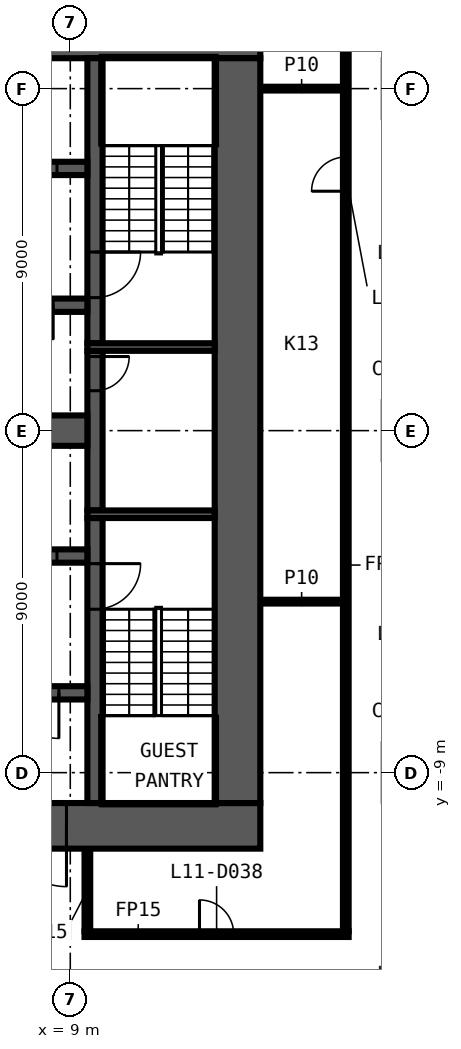
"""IFC4 building model, lengths in metres.
Left out: names, types, materials, properties, quantities, classifications, styles, units other than length and angle.
Written with IfcOpenShell. Run it as: python <this file> out.ifc"""

import sys

from ifc_helpers import new_model, si_unit, direction, frame, frame_2d, origin, place, context, subcontext, project, spatial, rectangle, extrude, element, fill, save


model = new_model("IFC4")
c1 = context("Model", 3, precision=1e-05, world=origin(), true_north=direction((0.0, 1.0)))
c2 = subcontext(c1, "Body", "Model", "MODEL_VIEW")
j1 = project(units=[si_unit("LENGTHUNIT", "METRE"), si_unit("PLANEANGLEUNIT", "RADIAN")], contexts=[c1])
p1 = place(None, origin())
s1 = spatial("IfcSite", under=j1, at=p1, CompositionType="ELEMENT")
p2 = place(p1, origin())
s2 = spatial("IfcBuilding", under=s1, at=p2, CompositionType="ELEMENT")
p3 = place(p2, frame((0.0, 0.0, 62.5)))
s3 = spatial("IfcBuildingStorey", under=s2, at=p3, CompositionType="ELEMENT", Elevation=62.5)
p4 = place(p3, frame((9.375, -13.25, 0.0), z_axis=(0.0, 0.0, 1.0), x_axis=(1.0, 0.0, 0.0)))
e1 = element("IfcWall", 1, at=p4, inside=s3, PredefinedType="PARTITIONING", context=c2, shape_type="SweptSolid", body=[
    extrude(rectangle(XDim=6.95, YDim=0.15, at=frame_2d((3.475, 0.0))), origin(), (0.0, 0.0, 1.0), 3.3),
])
p5 = place(p4, frame((3.025, 0.0, 0.0)))
e2 = element("IfcOpeningElement", 2, at=p5, cuts=e1, PredefinedType="OPENING", context=c2, shape_type="SweptSolid", body=[
    extrude(rectangle(XDim=0.9, YDim=2.1, at=frame_2d((0.45, 1.05))), frame((0.0, 0.085, 0.0), z_axis=(0.0, -1.0, 0.0), x_axis=(1.0, 0.0, 0.0)), (0.0, 0.0, 1.0), 0.17),
])
for number, where, z_axis, x_axis in (
    (3, (14.0, -4.5, 0.0), (0.0, 0.0, 1.0), (1.0, 0.0, 0.0)),
    (4, (14.0, 9.0, 0.0), (0.0, 0.0, 1.0), (1.0, 0.0, 0.0)),
):
    element("IfcWall", number, at=place(p3, frame(where, z_axis=z_axis, x_axis=x_axis)), inside=s3, PredefinedType="PARTITIONING", context=c2, shape_type="SweptSolid", body=[
        extrude(rectangle(XDim=2.175, YDim=0.1, at=frame_2d((1.087, 0.0))), origin(), (0.0, 0.0, 1.0), 3.3),
    ])
p6 = place(p3, frame((16.25, -13.175, 0.0), z_axis=(0.0, 0.0, 1.0), x_axis=(0.0, 1.0, 0.0)))
e5 = element("IfcWall", 5, at=p6, inside=s3, PredefinedType="PARTITIONING", context=c2, shape_type="SweptSolid", body=[
    extrude(rectangle(XDim=26.35, YDim=0.15, at=frame_2d((13.175, 0.0))), origin(), (0.0, 0.0, 1.0), 3.3),
])
p7 = place(p6, frame((19.475, 0.0, 0.0)))
e6 = element("IfcOpeningElement", 6, at=p7, cuts=e5, PredefinedType="OPENING", context=c2, shape_type="SweptSolid", body=[
    extrude(rectangle(XDim=0.9, YDim=2.1, at=frame_2d((0.45, 1.05))), frame((0.0, 0.085, 0.0), z_axis=(0.0, -1.0, 0.0), x_axis=(1.0, 0.0, 0.0)), (0.0, 0.0, 1.0), 0.17),
])
p8 = place(p3, frame((9.45, -13.175, 0.0), z_axis=(0.0, 0.0, 1.0), x_axis=(0.0, 1.0, 0.0)))
e7 = element("IfcWall", 7, at=p8, inside=s3, PredefinedType="PARTITIONING", context=c2, shape_type="SweptSolid", body=[
    extrude(rectangle(XDim=2.175, YDim=0.15, at=frame_2d((1.087, 0.0))), origin(), (0.0, 0.0, 1.0), 3.3),
])
p9 = place(p3, frame((-14.0, 10.4, 0.0), z_axis=(0.0, 0.0, 1.0), x_axis=(1.0, 0.0, 0.0)))
e8 = element("IfcWall", 8, at=p9, inside=s3, PredefinedType="SHEAR", context=c2, shape_type="SweptSolid", body=[
    extrude(rectangle(XDim=28.0, YDim=1.2, at=frame_2d((14.0, 0.0))), origin(), (0.0, 0.0, 1.0), 3.3),
])
p10 = place(p9, frame((15.9, 0.0, 0.0)))
e9 = element("IfcOpeningElement", 9, at=p10, cuts=e8, PredefinedType="OPENING", context=c2, shape_type="SweptSolid", body=[
    extrude(rectangle(XDim=1.6, YDim=2.1, at=frame_2d((0.8, 1.05))), frame((0.0, 0.61, 0.0), z_axis=(0.0, -1.0, 0.0), x_axis=(1.0, 0.0, 0.0)), (0.0, 0.0, 1.0), 1.22),
])
p11 = place(p3, frame((14.0, -10.4, 0.0), z_axis=(0.0, 0.0, 1.0), x_axis=(-1.0, 0.0, 0.0)))
e10 = element("IfcWall", 10, at=p11, inside=s3, PredefinedType="SHEAR", context=c2, shape_type="SweptSolid", body=[
    extrude(rectangle(XDim=28.0, YDim=1.2, at=frame_2d((14.0, 0.0))), origin(), (0.0, 0.0, 1.0), 3.3),
])
p12 = place(p11, frame((5.1, 0.0, 0.0)))
e11 = element("IfcOpeningElement", 11, at=p12, cuts=e10, PredefinedType="OPENING", context=c2, shape_type="SweptSolid", body=[
    extrude(rectangle(XDim=1.6, YDim=2.1, at=frame_2d((0.8, 1.05))), frame((0.0, 0.61, 0.0), z_axis=(0.0, -1.0, 0.0), x_axis=(1.0, 0.0, 0.0)), (0.0, 0.0, 1.0), 1.22),
])
p13 = place(p3, frame((13.4, 9.8, 0.0), z_axis=(0.0, 0.0, 1.0), x_axis=(0.0, -1.0, 0.0)))
e12 = element("IfcWall", 12, at=p13, inside=s3, PredefinedType="SHEAR", context=c2, shape_type="SweptSolid", body=[
    extrude(rectangle(XDim=19.6, YDim=1.2, at=frame_2d((9.8, 0.0))), origin(), (0.0, 0.0, 1.0), 3.3),
])
p14 = place(p3, frame((9.65, -2.3, 0.0), z_axis=(0.0, 0.0, 1.0), x_axis=(0.0, -1.0, 0.0)))
e13 = element("IfcWall", 13, at=p14, inside=s3, PredefinedType="SHEAR", context=c2, shape_type="SweptSolid", body=[
    extrude(rectangle(XDim=7.5, YDim=0.4, at=frame_2d((3.75, 0.0))), origin(), (0.0, 0.0, 1.0), 3.3),
])
p15 = place(p14, frame((1.2, 0.0, 0.0)))
e14 = element("IfcOpeningElement", 14, at=p15, cuts=e13, PredefinedType="OPENING", context=c2, shape_type="SweptSolid", body=[
    extrude(rectangle(XDim=1.2, YDim=2.1, at=frame_2d((0.6, 1.05))), frame((0.0, 0.21, 0.0), z_axis=(0.0, -1.0, 0.0), x_axis=(1.0, 0.0, 0.0)), (0.0, 0.0, 1.0), 0.42),
])
p16 = place(p3, frame((9.65, 2.1, 0.0), z_axis=(0.0, 0.0, 1.0), x_axis=(0.0, -1.0, 0.0)))
e15 = element("IfcWall", 15, at=p16, inside=s3, PredefinedType="SHEAR", context=c2, shape_type="SweptSolid", body=[
    extrude(rectangle(XDim=4.2, YDim=0.4, at=frame_2d((2.1, 0.0))), origin(), (0.0, 0.0, 1.0), 3.3),
])
p17 = place(p16, frame((0.15, 0.0, 0.0)))
e16 = element("IfcOpeningElement", 16, at=p17, cuts=e15, PredefinedType="OPENING", context=c2, shape_type="SweptSolid", body=[
    extrude(rectangle(XDim=0.9, YDim=2.1, at=frame_2d((0.45, 1.05))), frame((0.0, 0.21, 0.0), z_axis=(0.0, -1.0, 0.0), x_axis=(1.0, 0.0, 0.0)), (0.0, 0.0, 1.0), 0.42),
])
p18 = place(p3, frame((9.65, 9.8, 0.0), z_axis=(0.0, 0.0, 1.0), x_axis=(0.0, -1.0, 0.0)))
e17 = element("IfcWall", 17, at=p18, inside=s3, PredefinedType="SHEAR", context=c2, shape_type="SweptSolid", body=[
    extrude(rectangle(XDim=7.5, YDim=0.4, at=frame_2d((3.75, 0.0))), origin(), (0.0, 0.0, 1.0), 3.3),
])
p19 = place(p18, frame((5.1, 0.0, 0.0)))
e18 = element("IfcOpeningElement", 18, at=p19, cuts=e17, PredefinedType="OPENING", context=c2, shape_type="SweptSolid", body=[
    extrude(rectangle(XDim=1.2, YDim=2.1, at=frame_2d((0.6, 1.05))), frame((0.0, 0.21, 0.0), z_axis=(0.0, -1.0, 0.0), x_axis=(1.0, 0.0, 0.0)), (0.0, 0.0, 1.0), 0.42),
])
for number, where, z_axis, x_axis in (
    (19, (9.45, 2.2, 0.0), (0.0, 0.0, 1.0), (1.0, 0.0, 0.0)),
    (20, (9.45, -2.2, 0.0), (0.0, 0.0, 1.0), (1.0, 0.0, 0.0)),
):
    element("IfcWall", number, at=place(p3, frame(where, z_axis=z_axis, x_axis=x_axis)), inside=s3, PredefinedType="SHEAR", context=c2, shape_type="SweptSolid", body=[
        extrude(rectangle(XDim=3.35, YDim=0.2, at=frame_2d((1.675, 0.0))), origin(), (0.0, 0.0, 1.0), 3.3),
    ])
p20 = place(p3, frame((-9.45, 6.9, 0.0), z_axis=(0.0, 0.0, 1.0), x_axis=(1.0, 0.0, 0.0)))
e21 = element("IfcWall", 21, at=p20, inside=s3, PredefinedType="SHEAR", context=c2, shape_type="SweptSolid", body=[
    extrude(rectangle(XDim=18.9, YDim=0.35, at=frame_2d((9.45, 0.0))), origin(), (0.0, 0.0, 1.0), 3.3),
])
p21 = place(p20, frame((0.8, 0.0, 0.0)))
e22 = element("IfcOpeningElement", 22, at=p21, cuts=e21, PredefinedType="OPENING", context=c2, shape_type="SweptSolid", body=[
    extrude(rectangle(XDim=1.1, YDim=2.1, at=frame_2d((0.55, 1.05))), frame((0.0, 0.185, 0.0), z_axis=(0.0, -1.0, 0.0), x_axis=(1.0, 0.0, 0.0)), (0.0, 0.0, 1.0), 0.37),
])
p22 = place(p20, frame((3.5, 0.0, 0.0)))
e23 = element("IfcOpeningElement", 23, at=p22, cuts=e21, PredefinedType="OPENING", context=c2, shape_type="SweptSolid", body=[
    extrude(rectangle(XDim=1.1, YDim=2.1, at=frame_2d((0.55, 1.05))), frame((0.0, 0.185, 0.0), z_axis=(0.0, -1.0, 0.0), x_axis=(1.0, 0.0, 0.0)), (0.0, 0.0, 1.0), 0.37),
])
p23 = place(p20, frame((6.2, 0.0, 0.0)))
e24 = element("IfcOpeningElement", 24, at=p23, cuts=e21, PredefinedType="OPENING", context=c2, shape_type="SweptSolid", body=[
    extrude(rectangle(XDim=1.1, YDim=2.1, at=frame_2d((0.55, 1.05))), frame((0.0, 0.185, 0.0), z_axis=(0.0, -1.0, 0.0), x_axis=(1.0, 0.0, 0.0)), (0.0, 0.0, 1.0), 0.37),
])
p24 = place(p20, frame((8.9, 0.0, 0.0)))
e25 = element("IfcOpeningElement", 25, at=p24, cuts=e21, PredefinedType="OPENING", context=c2, shape_type="SweptSolid", body=[
    extrude(rectangle(XDim=1.1, YDim=2.1, at=frame_2d((0.55, 1.05))), frame((0.0, 0.185, 0.0), z_axis=(0.0, -1.0, 0.0), x_axis=(1.0, 0.0, 0.0)), (0.0, 0.0, 1.0), 0.37),
])
p25 = place(p20, frame((11.55, 0.0, 0.0)))
e26 = element("IfcOpeningElement", 26, at=p25, cuts=e21, PredefinedType="OPENING", context=c2, shape_type="SweptSolid", body=[
    extrude(rectangle(XDim=1.2, YDim=2.1, at=frame_2d((0.6, 1.05))), frame((0.0, 0.185, 0.0), z_axis=(0.0, -1.0, 0.0), x_axis=(1.0, 0.0, 0.0)), (0.0, 0.0, 1.0), 0.37),
])
p26 = place(p20, frame((14.3, 0.0, 0.0)))
e27 = element("IfcOpeningElement", 27, at=p26, cuts=e21, PredefinedType="OPENING", context=c2, shape_type="SweptSolid", body=[
    extrude(rectangle(XDim=1.1, YDim=2.1, at=frame_2d((0.55, 1.05))), frame((0.0, 0.185, 0.0), z_axis=(0.0, -1.0, 0.0), x_axis=(1.0, 0.0, 0.0)), (0.0, 0.0, 1.0), 0.37),
])
p27 = place(p20, frame((17.0, 0.0, 0.0)))
e28 = element("IfcOpeningElement", 28, at=p27, cuts=e21, PredefinedType="OPENING", context=c2, shape_type="SweptSolid", body=[
    extrude(rectangle(XDim=1.1, YDim=2.1, at=frame_2d((0.55, 1.05))), frame((0.0, 0.185, 0.0), z_axis=(0.0, -1.0, 0.0), x_axis=(1.0, 0.0, 0.0)), (0.0, 0.0, 1.0), 0.37),
])
p28 = place(p3, frame((9.45, 3.3, 0.0), z_axis=(0.0, 0.0, 1.0), x_axis=(-1.0, 0.0, 0.0)))
e29 = element("IfcWall", 29, at=p28, inside=s3, PredefinedType="SHEAR", context=c2, shape_type="SweptSolid", body=[
    extrude(rectangle(XDim=18.9, YDim=0.35, at=frame_2d((9.45, 0.0))), origin(), (0.0, 0.0, 1.0), 3.3),
])
p29 = place(p28, frame((17.0, 0.0, 0.0)))
e30 = element("IfcOpeningElement", 30, at=p29, cuts=e29, PredefinedType="OPENING", context=c2, shape_type="SweptSolid", body=[
    extrude(rectangle(XDim=1.1, YDim=2.1, at=frame_2d((0.55, 1.05))), frame((0.0, 0.185, 0.0), z_axis=(0.0, -1.0, 0.0), x_axis=(1.0, 0.0, 0.0)), (0.0, 0.0, 1.0), 0.37),
])
p30 = place(p28, frame((14.3, 0.0, 0.0)))
e31 = element("IfcOpeningElement", 31, at=p30, cuts=e29, PredefinedType="OPENING", context=c2, shape_type="SweptSolid", body=[
    extrude(rectangle(XDim=1.1, YDim=2.1, at=frame_2d((0.55, 1.05))), frame((0.0, 0.185, 0.0), z_axis=(0.0, -1.0, 0.0), x_axis=(1.0, 0.0, 0.0)), (0.0, 0.0, 1.0), 0.37),
])
p31 = place(p28, frame((11.6, 0.0, 0.0)))
e32 = element("IfcOpeningElement", 32, at=p31, cuts=e29, PredefinedType="OPENING", context=c2, shape_type="SweptSolid", body=[
    extrude(rectangle(XDim=1.1, YDim=2.1, at=frame_2d((0.55, 1.05))), frame((0.0, 0.185, 0.0), z_axis=(0.0, -1.0, 0.0), x_axis=(1.0, 0.0, 0.0)), (0.0, 0.0, 1.0), 0.37),
])
p32 = place(p28, frame((8.9, 0.0, 0.0)))
e33 = element("IfcOpeningElement", 33, at=p32, cuts=e29, PredefinedType="OPENING", context=c2, shape_type="SweptSolid", body=[
    extrude(rectangle(XDim=1.1, YDim=2.1, at=frame_2d((0.55, 1.05))), frame((0.0, 0.185, 0.0), z_axis=(0.0, -1.0, 0.0), x_axis=(1.0, 0.0, 0.0)), (0.0, 0.0, 1.0), 0.37),
])
p33 = place(p28, frame((6.2, 0.0, 0.0)))
e34 = element("IfcOpeningElement", 34, at=p33, cuts=e29, PredefinedType="OPENING", context=c2, shape_type="SweptSolid", body=[
    extrude(rectangle(XDim=1.1, YDim=2.1, at=frame_2d((0.55, 1.05))), frame((0.0, 0.185, 0.0), z_axis=(0.0, -1.0, 0.0), x_axis=(1.0, 0.0, 0.0)), (0.0, 0.0, 1.0), 0.37),
])
p34 = place(p28, frame((3.5, 0.0, 0.0)))
e35 = element("IfcOpeningElement", 35, at=p34, cuts=e29, PredefinedType="OPENING", context=c2, shape_type="SweptSolid", body=[
    extrude(rectangle(XDim=1.1, YDim=2.1, at=frame_2d((0.55, 1.05))), frame((0.0, 0.185, 0.0), z_axis=(0.0, -1.0, 0.0), x_axis=(1.0, 0.0, 0.0)), (0.0, 0.0, 1.0), 0.37),
])
p35 = place(p28, frame((0.9, 0.0, 0.0)))
e36 = element("IfcOpeningElement", 36, at=p35, cuts=e29, PredefinedType="OPENING", context=c2, shape_type="SweptSolid", body=[
    extrude(rectangle(XDim=0.9, YDim=2.1, at=frame_2d((0.45, 1.05))), frame((0.0, 0.185, 0.0), z_axis=(0.0, -1.0, 0.0), x_axis=(1.0, 0.0, 0.0)), (0.0, 0.0, 1.0), 0.37),
])
p36 = place(p3, frame((-9.45, -3.3, 0.0), z_axis=(0.0, 0.0, 1.0), x_axis=(1.0, 0.0, 0.0)))
e37 = element("IfcWall", 37, at=p36, inside=s3, PredefinedType="SHEAR", context=c2, shape_type="SweptSolid", body=[
    extrude(rectangle(XDim=18.9, YDim=0.35, at=frame_2d((9.45, 0.0))), origin(), (0.0, 0.0, 1.0), 3.3),
])
p37 = place(p36, frame((17.0, 0.0, 0.0)))
e38 = element("IfcOpeningElement", 38, at=p37, cuts=e37, PredefinedType="OPENING", context=c2, shape_type="SweptSolid", body=[
    extrude(rectangle(XDim=1.1, YDim=2.1, at=frame_2d((0.55, 1.05))), frame((0.0, 0.185, 0.0), z_axis=(0.0, -1.0, 0.0), x_axis=(1.0, 0.0, 0.0)), (0.0, 0.0, 1.0), 0.37),
])
p38 = place(p36, frame((0.9, 0.0, 0.0)))
e39 = element("IfcOpeningElement", 39, at=p38, cuts=e37, PredefinedType="OPENING", context=c2, shape_type="SweptSolid", body=[
    extrude(rectangle(XDim=0.9, YDim=2.1, at=frame_2d((0.45, 1.05))), frame((0.0, 0.185, 0.0), z_axis=(0.0, -1.0, 0.0), x_axis=(1.0, 0.0, 0.0)), (0.0, 0.0, 1.0), 0.37),
])
p39 = place(p36, frame((6.3, 0.0, 0.0)))
e40 = element("IfcOpeningElement", 40, at=p39, cuts=e37, PredefinedType="OPENING", context=c2, shape_type="SweptSolid", body=[
    extrude(rectangle(XDim=0.9, YDim=2.1, at=frame_2d((0.45, 1.05))), frame((0.0, 0.185, 0.0), z_axis=(0.0, -1.0, 0.0), x_axis=(1.0, 0.0, 0.0)), (0.0, 0.0, 1.0), 0.37),
])
p40 = place(p3, frame((9.45, -6.9, 0.0), z_axis=(0.0, 0.0, 1.0), x_axis=(-1.0, 0.0, 0.0)))
e41 = element("IfcWall", 41, at=p40, inside=s3, PredefinedType="SHEAR", context=c2, shape_type="SweptSolid", body=[
    extrude(rectangle(XDim=18.9, YDim=0.35, at=frame_2d((9.45, 0.0))), origin(), (0.0, 0.0, 1.0), 3.3),
])
p41 = place(p40, frame((0.75, 0.0, 0.0)))
e42 = element("IfcOpeningElement", 42, at=p41, cuts=e41, PredefinedType="OPENING", context=c2, shape_type="SweptSolid", body=[
    extrude(rectangle(XDim=1.2, YDim=2.1, at=frame_2d((0.6, 1.05))), frame((0.0, 0.185, 0.0), z_axis=(0.0, -1.0, 0.0), x_axis=(1.0, 0.0, 0.0)), (0.0, 0.0, 1.0), 0.37),
])
p42 = place(p40, frame((17.1, 0.0, 0.0)))
e43 = element("IfcOpeningElement", 43, at=p42, cuts=e41, PredefinedType="OPENING", context=c2, shape_type="SweptSolid", body=[
    extrude(rectangle(XDim=0.9, YDim=2.1, at=frame_2d((0.45, 1.05))), frame((0.0, 0.185, 0.0), z_axis=(0.0, -1.0, 0.0), x_axis=(1.0, 0.0, 0.0)), (0.0, 0.0, 1.0), 0.37),
])
p43 = place(p40, frame((13.05, 0.0, 0.0)))
e44 = element("IfcOpeningElement", 44, at=p43, cuts=e41, PredefinedType="OPENING", context=c2, shape_type="SweptSolid", body=[
    extrude(rectangle(XDim=0.9, YDim=2.1, at=frame_2d((0.45, 1.05))), frame((0.0, 0.185, 0.0), z_axis=(0.0, -1.0, 0.0), x_axis=(1.0, 0.0, 0.0)), (0.0, 0.0, 1.0), 0.37),
])
p44 = place(p40, frame((9.0, 0.0, 0.0)))
e45 = element("IfcOpeningElement", 45, at=p44, cuts=e41, PredefinedType="OPENING", context=c2, shape_type="SweptSolid", body=[
    extrude(rectangle(XDim=0.9, YDim=2.1, at=frame_2d((0.45, 1.05))), frame((0.0, 0.185, 0.0), z_axis=(0.0, -1.0, 0.0), x_axis=(1.0, 0.0, 0.0)), (0.0, 0.0, 1.0), 0.37),
])
p45 = place(p3, frame((-9.45, 0.0, 0.0), z_axis=(0.0, 0.0, 1.0), x_axis=(1.0, 0.0, 0.0)))
e46 = element("IfcWall", 46, at=p45, inside=s3, PredefinedType="SHEAR", context=c2, shape_type="SweptSolid", body=[
    extrude(rectangle(XDim=18.9, YDim=0.8, at=frame_2d((9.45, 0.0))), origin(), (0.0, 0.0, 1.0), 3.3),
])
p46 = place(p5, origin())
e47 = element("IfcDoor", 47, at=p46, inside=s3, OperationType="SINGLE_SWING_LEFT", PredefinedType="DOOR", context=c2, shape_type="SweptSolid", body=[
    extrude(rectangle(XDim=0.9, YDim=2.1, at=frame_2d((0.45, 1.05))), frame((0.0, 0.025, 0.0), z_axis=(0.0, -1.0, 0.0), x_axis=(1.0, 0.0, 0.0)), (0.0, 0.0, 1.0), 0.05),
])
fill(e2, e47)
p47 = place(p7, origin())
e48 = element("IfcDoor", 48, at=p47, inside=s3, OperationType="SINGLE_SWING_RIGHT", PredefinedType="DOOR", context=c2, shape_type="SweptSolid", body=[
    extrude(rectangle(XDim=0.9, YDim=2.1, at=frame_2d((0.45, 1.05))), frame((0.0, 0.025, 0.0), z_axis=(0.0, -1.0, 0.0), x_axis=(1.0, 0.0, 0.0)), (0.0, 0.0, 1.0), 0.05),
])
fill(e6, e48)
p48 = place(p17, origin())
e49 = element("IfcDoor", 49, at=p48, inside=s3, OperationType="SINGLE_SWING_RIGHT", PredefinedType="DOOR", context=c2, shape_type="SweptSolid", body=[
    extrude(rectangle(XDim=0.9, YDim=2.1, at=frame_2d((0.45, 1.05))), frame((0.0, 0.025, 0.0), z_axis=(0.0, -1.0, 0.0), x_axis=(1.0, 0.0, 0.0)), (0.0, 0.0, 1.0), 0.05),
])
fill(e16, e49)
p49 = place(p27, origin())
e50 = element("IfcDoor", 50, at=p49, inside=s3, OperationType="DOUBLE_DOOR_SLIDING", PredefinedType="DOOR", context=c2, shape_type="SweptSolid", body=[
    extrude(rectangle(XDim=1.1, YDim=2.1, at=frame_2d((0.55, 1.05))), frame((0.0, 0.025, 0.0), z_axis=(0.0, -1.0, 0.0), x_axis=(1.0, 0.0, 0.0)), (0.0, 0.0, 1.0), 0.05),
])
fill(e28, e50)
p50 = place(p35, origin())
e51 = element("IfcDoor", 51, at=p50, inside=s3, OperationType="SINGLE_SWING_LEFT", PredefinedType="DOOR", context=c2, shape_type="SweptSolid", body=[
    extrude(rectangle(XDim=0.9, YDim=2.1, at=frame_2d((0.45, 1.05))), frame((0.0, 0.025, 0.0), z_axis=(0.0, -1.0, 0.0), x_axis=(1.0, 0.0, 0.0)), (0.0, 0.0, 1.0), 0.05),
])
fill(e36, e51)
p51 = place(p37, origin())
e52 = element("IfcDoor", 52, at=p51, inside=s3, OperationType="DOUBLE_DOOR_SLIDING", PredefinedType="DOOR", context=c2, shape_type="SweptSolid", body=[
    extrude(rectangle(XDim=1.1, YDim=2.1, at=frame_2d((0.55, 1.05))), frame((0.0, 0.025, 0.0), z_axis=(0.0, -1.0, 0.0), x_axis=(1.0, 0.0, 0.0)), (0.0, 0.0, 1.0), 0.05),
])
fill(e38, e52)
p52 = place(p12, origin())
e53 = element("IfcDoor", 53, at=p52, inside=s3, OperationType="DOUBLE_DOOR_SINGLE_SWING", PredefinedType="DOOR", context=c2, shape_type="SweptSolid", body=[
    extrude(rectangle(XDim=1.6, YDim=2.1, at=frame_2d((0.8, 1.05))), frame((0.0, 0.025, 0.0), z_axis=(0.0, -1.0, 0.0), x_axis=(1.0, 0.0, 0.0)), (0.0, 0.0, 1.0), 0.05),
])
fill(e11, e53)
p53 = place(p41, origin())
e54 = element("IfcDoor", 54, at=p53, inside=s3, OperationType="SINGLE_SWING_LEFT", PredefinedType="DOOR", context=c2, shape_type="SweptSolid", body=[
    extrude(rectangle(XDim=1.2, YDim=2.1, at=frame_2d((0.6, 1.05))), frame((0.0, 0.025, 0.0), z_axis=(0.0, -1.0, 0.0), x_axis=(1.0, 0.0, 0.0)), (0.0, 0.0, 1.0), 0.05),
])
fill(e42, e54)
p54 = place(p19, origin())
e55 = element("IfcDoor", 55, at=p54, inside=s3, OperationType="SINGLE_SWING_LEFT", PredefinedType="DOOR", context=c2, shape_type="SweptSolid", body=[
    extrude(rectangle(XDim=1.2, YDim=2.1, at=frame_2d((0.6, 1.05))), frame((0.0, 0.025, 0.0), z_axis=(0.0, -1.0, 0.0), x_axis=(1.0, 0.0, 0.0)), (0.0, 0.0, 1.0), 0.05),
])
fill(e18, e55)
p55 = place(p15, origin())
e56 = element("IfcDoor", 56, at=p55, inside=s3, OperationType="SINGLE_SWING_RIGHT", PredefinedType="DOOR", context=c2, shape_type="SweptSolid", body=[
    extrude(rectangle(XDim=1.2, YDim=2.1, at=frame_2d((0.6, 1.05))), frame((0.0, 0.025, 0.0), z_axis=(0.0, -1.0, 0.0), x_axis=(1.0, 0.0, 0.0)), (0.0, 0.0, 1.0), 0.05),
])
fill(e14, e56)
save(model, sys.argv[1])
